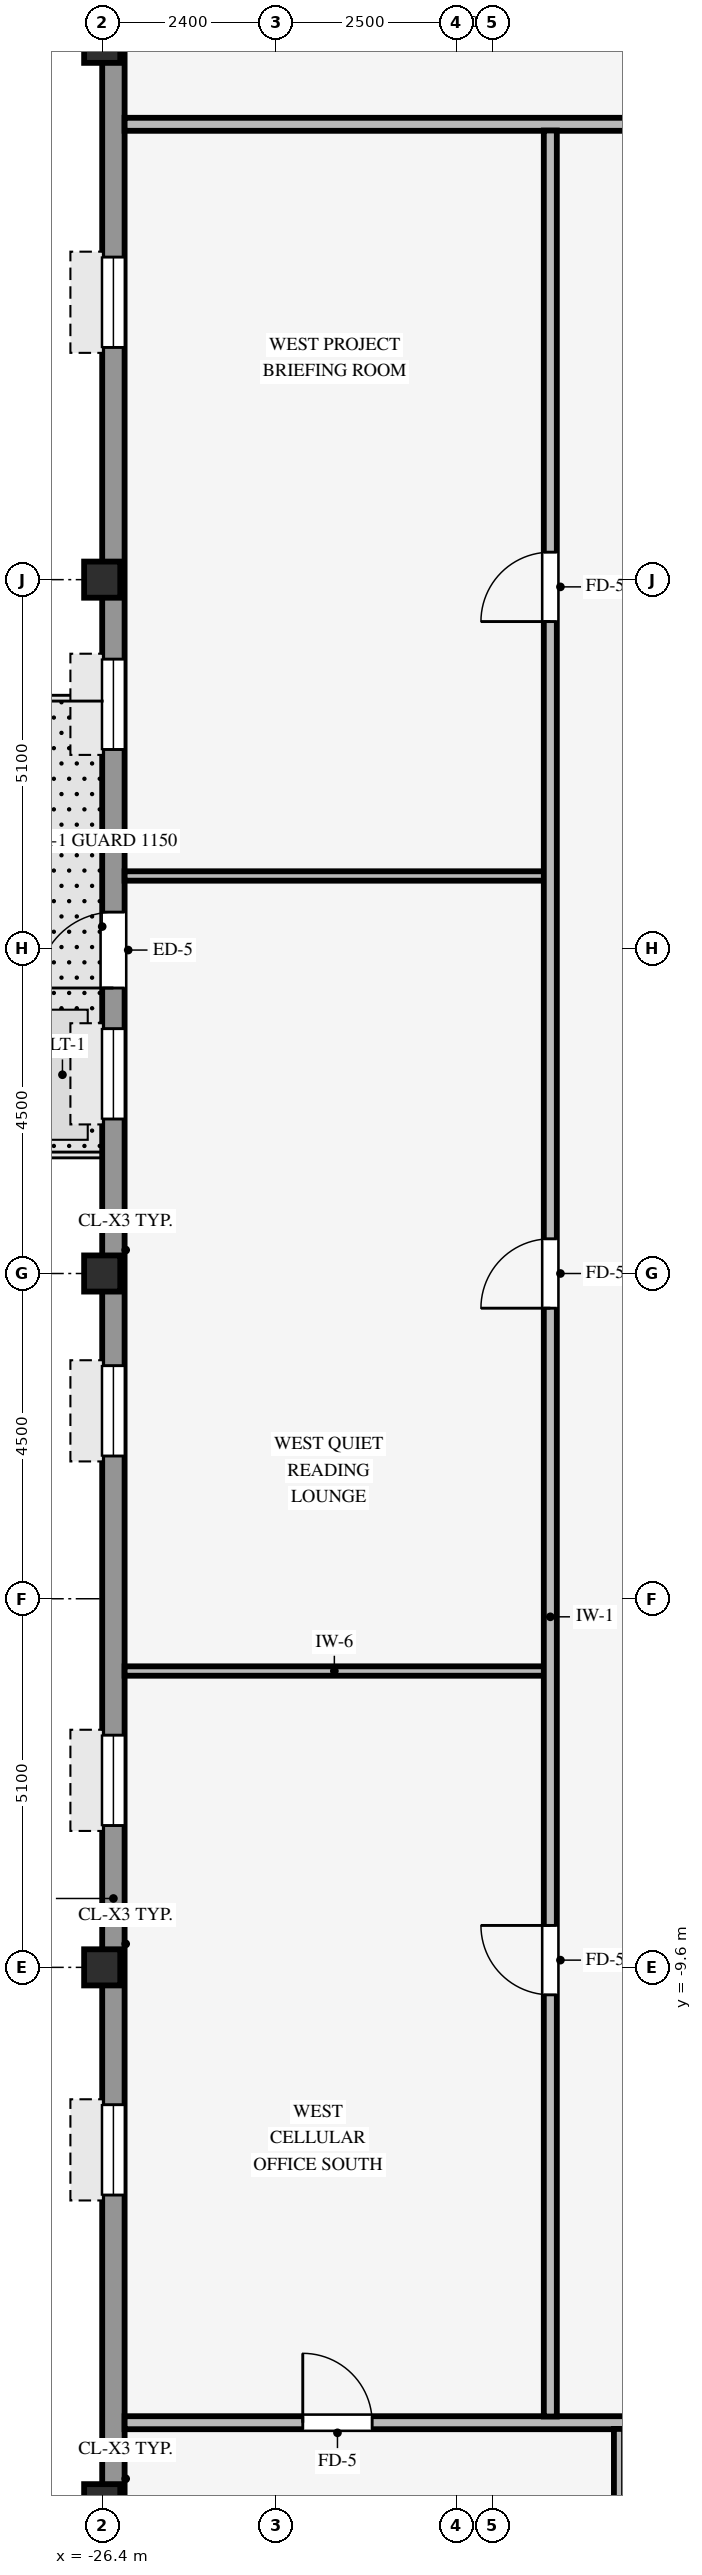
"""IFC4 building model, lengths in metres.
Left out: names, types, materials, properties, quantities, classifications, styles, units other than length and angle.
Written with IfcOpenShell. Run it as: python <this file> out.ifc"""

import sys

from ifc_helpers import new_model, si_unit, direction, frame, frame_2d, origin, origin_2d, place, context, subcontext, project, spatial, rectangle, hollow_rectangle, extrude, source, transform, mapped, element, fill, save


model = new_model("IFC4")
c1 = context("Model", 3, precision=1e-05, world=origin(), true_north=direction((0.0, 1.0)))
c2 = subcontext(c1, "Body", "Model", "MODEL_VIEW")
j1 = project(units=[si_unit("LENGTHUNIT", "METRE"), si_unit("PLANEANGLEUNIT", "RADIAN")], contexts=[c1])
p1 = place(None, origin())
s1 = spatial("IfcSite", under=j1, at=p1, CompositionType="ELEMENT")
p2 = place(p1, origin())
s2 = spatial("IfcBuilding", under=s1, at=p2, CompositionType="ELEMENT")
p3 = place(p2, frame((0.0, 0.0, 198.2)))
s3 = spatial("IfcBuildingStorey", under=s2, at=p3, CompositionType="ELEMENT", Elevation=198.2)
for number, where, z_axis, x_axis in (
    (1, (-26.4, -17.0, 0.0), (0.0, 0.0, 1.0), (1.0, 0.0, 0.0)),
    (2, (-26.4, -9.6, 0.0), (0.0, 0.0, 1.0), (1.0, 0.0, 0.0)),
    (3, (-26.4, 0.0, 0.0), (0.0, 0.0, 1.0), (1.0, 0.0, 0.0)),
    (4, (-26.4, 9.6, 0.0), (0.0, 0.0, 1.0), (1.0, 0.0, 0.0)),
    (5, (-26.4, 17.0, 0.0), (0.0, 0.0, 1.0), (1.0, 0.0, 0.0)),
):
    element("IfcColumn", number, at=place(p3, frame(where, z_axis=z_axis, x_axis=x_axis)), inside=s3, PredefinedType="COLUMN", context=c2, shape_type="SweptSolid", body=[
        extrude(hollow_rectangle(XDim=0.5, YDim=0.5, WallThickness=0.032, InnerFilletRadius=0.032, OuterFilletRadius=0.064, at=origin_2d()), origin(), (0.0, 0.0, 1.0), 3.37),
    ])
p4 = place(p3, frame((-26.245, -20.794, 0.0), z_axis=(0.0, 0.0, 1.0), x_axis=(0.0, 1.0, 0.0)))
e6 = element("IfcWall", 6, at=p4, inside=s3, PredefinedType="STANDARD", context=c2, shape_type="SweptSolid", body=[
    extrude(rectangle(XDim=37.788, YDim=0.31, at=frame_2d((18.894, 0.0))), origin(), (0.0, 0.0, 1.0), 2.705),
])
p5 = place(p4, frame((24.744, 0.0, 0.0)))
e7 = element("IfcOpeningElement", 7, at=p5, cuts=e6, PredefinedType="OPENING", context=c2, shape_type="SweptSolid", body=[
    extrude(rectangle(XDim=1.05, YDim=2.1, at=frame_2d((0.525, 1.05))), frame((0.0, 0.165, 0.0), z_axis=(0.0, -1.0, 0.0), x_axis=(1.0, 0.0, 0.0)), (0.0, 0.0, 1.0), 0.33),
])
p6 = place(p4, frame((1.581, 0.0, 0.8)))
e8 = element("IfcOpeningElement", 8, at=p6, cuts=e6, PredefinedType="OPENING", context=c2, shape_type="SweptSolid", body=[
    extrude(rectangle(XDim=1.25, YDim=1.52, at=frame_2d((0.625, 0.76))), frame((0.0, 0.165, 0.0), z_axis=(0.0, -1.0, 0.0), x_axis=(1.0, 0.0, 0.0)), (0.0, 0.0, 1.0), 0.33),
])
p7 = place(p4, frame((8.044, 0.0, 0.8)))
e9 = element("IfcOpeningElement", 9, at=p7, cuts=e6, PredefinedType="OPENING", context=c2, shape_type="SweptSolid", body=[
    extrude(rectangle(XDim=1.25, YDim=1.52, at=frame_2d((0.625, 0.76))), frame((0.0, 0.165, 0.0), z_axis=(0.0, -1.0, 0.0), x_axis=(1.0, 0.0, 0.0)), (0.0, 0.0, 1.0), 0.33),
])
p8 = place(p4, frame((13.156, 0.0, 0.8)))
e10 = element("IfcOpeningElement", 10, at=p8, cuts=e6, PredefinedType="OPENING", context=c2, shape_type="SweptSolid", body=[
    extrude(rectangle(XDim=1.25, YDim=1.52, at=frame_2d((0.625, 0.76))), frame((0.0, 0.165, 0.0), z_axis=(0.0, -1.0, 0.0), x_axis=(1.0, 0.0, 0.0)), (0.0, 0.0, 1.0), 0.33),
])
p9 = place(p4, frame((18.269, 0.0, 0.8)))
e11 = element("IfcOpeningElement", 11, at=p9, cuts=e6, PredefinedType="OPENING", context=c2, shape_type="SweptSolid", body=[
    extrude(rectangle(XDim=1.25, YDim=1.52, at=frame_2d((0.625, 0.76))), frame((0.0, 0.165, 0.0), z_axis=(0.0, -1.0, 0.0), x_axis=(1.0, 0.0, 0.0)), (0.0, 0.0, 1.0), 0.33),
])
p10 = place(p4, frame((22.932, 0.0, 0.8)))
e12 = element("IfcOpeningElement", 12, at=p10, cuts=e6, PredefinedType="OPENING", context=c2, shape_type="SweptSolid", body=[
    extrude(rectangle(XDim=1.25, YDim=1.52, at=frame_2d((0.625, 0.76))), frame((0.0, 0.165, 0.0), z_axis=(0.0, -1.0, 0.0), x_axis=(1.0, 0.0, 0.0)), (0.0, 0.0, 1.0), 0.33),
])
p11 = place(p4, frame((28.044, 0.0, 0.8)))
e13 = element("IfcOpeningElement", 13, at=p11, cuts=e6, PredefinedType="OPENING", context=c2, shape_type="SweptSolid", body=[
    extrude(rectangle(XDim=1.25, YDim=1.52, at=frame_2d((0.625, 0.76))), frame((0.0, 0.165, 0.0), z_axis=(0.0, -1.0, 0.0), x_axis=(1.0, 0.0, 0.0)), (0.0, 0.0, 1.0), 0.33),
])
p12 = place(p4, frame((33.607, 0.0, 0.8)))
e14 = element("IfcOpeningElement", 14, at=p12, cuts=e6, PredefinedType="OPENING", context=c2, shape_type="SweptSolid", body=[
    extrude(rectangle(XDim=1.25, YDim=1.52, at=frame_2d((0.625, 0.76))), frame((0.0, 0.165, 0.0), z_axis=(0.0, -1.0, 0.0), x_axis=(1.0, 0.0, 0.0)), (0.0, 0.0, 1.0), 0.33),
])
p13 = place(p3, frame((-26.09, -15.9, 0.0), z_axis=(0.0, 0.0, 1.0), x_axis=(1.0, 0.0, 0.0)))
e15 = element("IfcWall", 15, at=p13, inside=s3, PredefinedType="PARTITIONING", context=c2, shape_type="SweptSolid", body=[
    extrude(rectangle(XDim=48.38, YDim=0.18, at=frame_2d((24.19, 0.0))), origin(), (0.0, 0.0, 1.0), 3.36),
])
p14 = place(p13, frame((41.81, 0.0, 0.0)))
e16 = element("IfcOpeningElement", 16, at=p14, cuts=e15, PredefinedType="OPENING", context=c2, shape_type="SweptSolid", body=[
    extrude(rectangle(XDim=0.96, YDim=2.1, at=frame_2d((0.48, 1.05))), frame((0.0, 0.1, 0.0), z_axis=(0.0, -1.0, 0.0), x_axis=(1.0, 0.0, 0.0)), (0.0, 0.0, 1.0), 0.2),
])
p15 = place(p13, frame((17.985, 0.0, 0.0)))
e17 = element("IfcOpeningElement", 17, at=p15, cuts=e15, PredefinedType="OPENING", context=c2, shape_type="SweptSolid", body=[
    extrude(rectangle(XDim=0.96, YDim=2.1, at=frame_2d((0.48, 1.05))), frame((0.0, 0.1, 0.0), z_axis=(0.0, -1.0, 0.0), x_axis=(1.0, 0.0, 0.0)), (0.0, 0.0, 1.0), 0.2),
])
p16 = place(p13, frame((26.55, 0.0, 0.0)))
e18 = element("IfcOpeningElement", 18, at=p16, cuts=e15, PredefinedType="OPENING", context=c2, shape_type="SweptSolid", body=[
    extrude(rectangle(XDim=0.96, YDim=2.1, at=frame_2d((0.48, 1.05))), frame((0.0, 0.1, 0.0), z_axis=(0.0, -1.0, 0.0), x_axis=(1.0, 0.0, 0.0)), (0.0, 0.0, 1.0), 0.2),
])
p17 = place(p13, frame((10.935, 0.0, 0.0)))
e19 = element("IfcOpeningElement", 19, at=p17, cuts=e15, PredefinedType="OPENING", context=c2, shape_type="SweptSolid", body=[
    extrude(rectangle(XDim=0.96, YDim=2.1, at=frame_2d((0.48, 1.05))), frame((0.0, 0.1, 0.0), z_axis=(0.0, -1.0, 0.0), x_axis=(1.0, 0.0, 0.0)), (0.0, 0.0, 1.0), 0.2),
])
p18 = place(p13, frame((35.91, 0.0, 0.0)))
e20 = element("IfcOpeningElement", 20, at=p18, cuts=e15, PredefinedType="OPENING", context=c2, shape_type="SweptSolid", body=[
    extrude(rectangle(XDim=0.96, YDim=2.1, at=frame_2d((0.48, 1.05))), frame((0.0, 0.1, 0.0), z_axis=(0.0, -1.0, 0.0), x_axis=(1.0, 0.0, 0.0)), (0.0, 0.0, 1.0), 0.2),
])
p19 = place(p13, frame((2.465, 0.0, 0.0)))
e21 = element("IfcOpeningElement", 21, at=p19, cuts=e15, PredefinedType="OPENING", context=c2, shape_type="SweptSolid", body=[
    extrude(rectangle(XDim=0.96, YDim=2.1, at=frame_2d((0.48, 1.05))), frame((0.0, 0.1, 0.0), z_axis=(0.0, -1.0, 0.0), x_axis=(1.0, 0.0, 0.0)), (0.0, 0.0, 1.0), 0.2),
])
for number, where, z_axis, x_axis in (
    (22, (-26.09, -5.5, 0.0), (0.0, 0.0, 1.0), (1.0, 0.0, 0.0)),
    (23, (-26.09, 5.5, 0.0), (0.0, 0.0, 1.0), (1.0, 0.0, 0.0)),
):
    element("IfcWall", number, at=place(p3, frame(where, z_axis=z_axis, x_axis=x_axis)), inside=s3, PredefinedType="PARTITIONING", context=c2, shape_type="SweptSolid", body=[
        extrude(rectangle(XDim=5.804, YDim=0.13, at=frame_2d((2.902, 0.0))), origin(), (0.0, 0.0, 1.0), 3.36),
    ])
p20 = place(p3, frame((-26.09, 15.9, 0.0), z_axis=(0.0, 0.0, 1.0), x_axis=(1.0, 0.0, 0.0)))
e24 = element("IfcWall", 24, at=p20, inside=s3, PredefinedType="PARTITIONING", context=c2, shape_type="SweptSolid", body=[
    extrude(rectangle(XDim=48.38, YDim=0.18, at=frame_2d((24.19, 0.0))), origin(), (0.0, 0.0, 1.0), 3.36),
])
p21 = place(p20, frame((14.29, 0.0, 0.0)))
e25 = element("IfcOpeningElement", 25, at=p21, cuts=e24, PredefinedType="OPENING", context=c2, shape_type="SweptSolid", body=[
    extrude(rectangle(XDim=0.96, YDim=2.1, at=frame_2d((0.48, 1.05))), frame((0.0, 0.1, 0.0), z_axis=(0.0, -1.0, 0.0), x_axis=(1.0, 0.0, 0.0)), (0.0, 0.0, 1.0), 0.2),
])
p22 = place(p20, frame((40.51, 0.0, 0.0)))
e26 = element("IfcOpeningElement", 26, at=p22, cuts=e24, PredefinedType="OPENING", context=c2, shape_type="SweptSolid", body=[
    extrude(rectangle(XDim=0.96, YDim=2.1, at=frame_2d((0.48, 1.05))), frame((0.0, 0.1, 0.0), z_axis=(0.0, -1.0, 0.0), x_axis=(1.0, 0.0, 0.0)), (0.0, 0.0, 1.0), 0.2),
])
p23 = place(p3, frame((-20.2, -15.814, 0.0), z_axis=(0.0, 0.0, 1.0), x_axis=(0.0, 1.0, 0.0)))
e27 = element("IfcWall", 27, at=p23, inside=s3, PredefinedType="PARTITIONING", context=c2, shape_type="SweptSolid", body=[
    extrude(rectangle(XDim=31.628, YDim=0.18, at=frame_2d((15.814, 0.0))), origin(), (0.0, 0.0, 1.0), 3.36),
])
p24 = place(p23, frame((15.334, 0.0, 0.0)))
e28 = element("IfcOpeningElement", 28, at=p24, cuts=e27, PredefinedType="OPENING", context=c2, shape_type="SweptSolid", body=[
    extrude(rectangle(XDim=0.96, YDim=2.1, at=frame_2d((0.48, 1.05))), frame((0.0, 0.1, 0.0), z_axis=(0.0, -1.0, 0.0), x_axis=(1.0, 0.0, 0.0)), (0.0, 0.0, 1.0), 0.2),
])
p25 = place(p23, frame((5.834, 0.0, 0.0)))
e29 = element("IfcOpeningElement", 29, at=p25, cuts=e27, PredefinedType="OPENING", context=c2, shape_type="SweptSolid", body=[
    extrude(rectangle(XDim=0.96, YDim=2.1, at=frame_2d((0.48, 1.05))), frame((0.0, 0.1, 0.0), z_axis=(0.0, -1.0, 0.0), x_axis=(1.0, 0.0, 0.0)), (0.0, 0.0, 1.0), 0.2),
])
p26 = place(p23, frame((24.834, 0.0, 0.0)))
e30 = element("IfcOpeningElement", 30, at=p26, cuts=e27, PredefinedType="OPENING", context=c2, shape_type="SweptSolid", body=[
    extrude(rectangle(XDim=0.96, YDim=2.1, at=frame_2d((0.48, 1.05))), frame((0.0, 0.1, 0.0), z_axis=(0.0, -1.0, 0.0), x_axis=(1.0, 0.0, 0.0)), (0.0, 0.0, 1.0), 0.2),
])
p27 = place(p3, frame((-19.25, -22.89, 0.0), z_axis=(0.0, 0.0, 1.0), x_axis=(0.0, 1.0, 0.0)))
e31 = element("IfcWall", 31, at=p27, inside=s3, PredefinedType="PARTITIONING", context=c2, shape_type="SweptSolid", body=[
    extrude(rectangle(XDim=6.904, YDim=0.14, at=frame_2d((3.452, 0.0))), origin(), (0.0, 0.0, 1.0), 3.36),
])
m1 = source(origin(), c2, "Body", "SweptSolid", [
    extrude(rectangle(XDim=1.05, YDim=2.1, at=frame_2d((0.525, 1.05))), frame((0.0, 0.025, 0.0), z_axis=(0.0, -1.0, 0.0), x_axis=(1.0, 0.0, 0.0)), (0.0, 0.0, 1.0), 0.05),
])
p28 = place(p5, origin())
e32 = element("IfcDoor", 32, at=p28, inside=s3, OperationType="SINGLE_SWING_LEFT", PredefinedType="DOOR", context=c2, shape_type="MappedRepresentation", body=[
    mapped(m1, transform((0.0, 0.0, 0.0), scale=1.0)),
])
fill(e7, e32)
m2 = source(origin(), c2, "Body", "SweptSolid", [
    extrude(rectangle(XDim=1.25, YDim=1.52, at=frame_2d((0.625, 0.76))), frame((0.0, 0.03, 0.0), z_axis=(0.0, -1.0, 0.0), x_axis=(1.0, 0.0, 0.0)), (0.0, 0.0, 1.0), 0.06),
])
p29 = place(p7, origin())
e33 = element("IfcWindow", 33, at=p29, inside=s3, PartitioningType="SINGLE_PANEL", PredefinedType="WINDOW", context=c2, shape_type="MappedRepresentation", body=[
    mapped(m2, transform((0.0, 0.0, 0.0), scale=1.0)),
])
fill(e9, e33)
p30 = place(p8, origin())
e34 = element("IfcWindow", 34, at=p30, inside=s3, PartitioningType="SINGLE_PANEL", PredefinedType="WINDOW", context=c2, shape_type="MappedRepresentation", body=[
    mapped(m2, transform((0.0, 0.0, 0.0), scale=1.0)),
])
fill(e10, e34)
p31 = place(p9, origin())
e35 = element("IfcWindow", 35, at=p31, inside=s3, PartitioningType="SINGLE_PANEL", PredefinedType="WINDOW", context=c2, shape_type="MappedRepresentation", body=[
    mapped(m2, transform((0.0, 0.0, 0.0), scale=1.0)),
])
fill(e11, e35)
p32 = place(p10, origin())
e36 = element("IfcWindow", 36, at=p32, inside=s3, PartitioningType="SINGLE_PANEL", PredefinedType="WINDOW", context=c2, shape_type="MappedRepresentation", body=[
    mapped(m2, transform((0.0, 0.0, 0.0), scale=1.0)),
])
fill(e12, e36)
p33 = place(p11, origin())
e37 = element("IfcWindow", 37, at=p33, inside=s3, PartitioningType="SINGLE_PANEL", PredefinedType="WINDOW", context=c2, shape_type="MappedRepresentation", body=[
    mapped(m2, transform((0.0, 0.0, 0.0), scale=1.0)),
])
fill(e13, e37)
p34 = place(p12, origin())
e38 = element("IfcWindow", 38, at=p34, inside=s3, PartitioningType="SINGLE_PANEL", PredefinedType="WINDOW", context=c2, shape_type="MappedRepresentation", body=[
    mapped(m2, transform((0.0, 0.0, 0.0), scale=1.0)),
])
fill(e14, e38)
m3 = source(origin(), c2, "Body", "SweptSolid", [
    extrude(rectangle(XDim=0.96, YDim=2.1, at=frame_2d((0.48, 1.05))), frame((0.0, 0.025, 0.0), z_axis=(0.0, -1.0, 0.0), x_axis=(1.0, 0.0, 0.0)), (0.0, 0.0, 1.0), 0.05),
])
p35 = place(p24, origin())
e39 = element("IfcDoor", 39, at=p35, inside=s3, OperationType="SINGLE_SWING_LEFT", PredefinedType="DOOR", context=c2, shape_type="MappedRepresentation", body=[
    mapped(m3, transform((0.0, 0.0, 0.0), scale=1.0)),
])
fill(e28, e39)
p36 = place(p25, origin())
e40 = element("IfcDoor", 40, at=p36, inside=s3, OperationType="SINGLE_SWING_RIGHT", PredefinedType="DOOR", context=c2, shape_type="MappedRepresentation", body=[
    mapped(m3, transform((0.0, 0.0, 0.0), scale=1.0)),
])
fill(e29, e40)
p37 = place(p26, origin())
e41 = element("IfcDoor", 41, at=p37, inside=s3, OperationType="SINGLE_SWING_LEFT", PredefinedType="DOOR", context=c2, shape_type="MappedRepresentation", body=[
    mapped(m3, transform((0.0, 0.0, 0.0), scale=1.0)),
])
fill(e30, e41)
p38 = place(p19, origin())
e42 = element("IfcDoor", 42, at=p38, inside=s3, OperationType="SINGLE_SWING_LEFT", PredefinedType="DOOR", context=c2, shape_type="MappedRepresentation", body=[
    mapped(m3, transform((0.0, 0.0, 0.0), scale=1.0)),
])
fill(e21, e42)
save(model, sys.argv[1])
